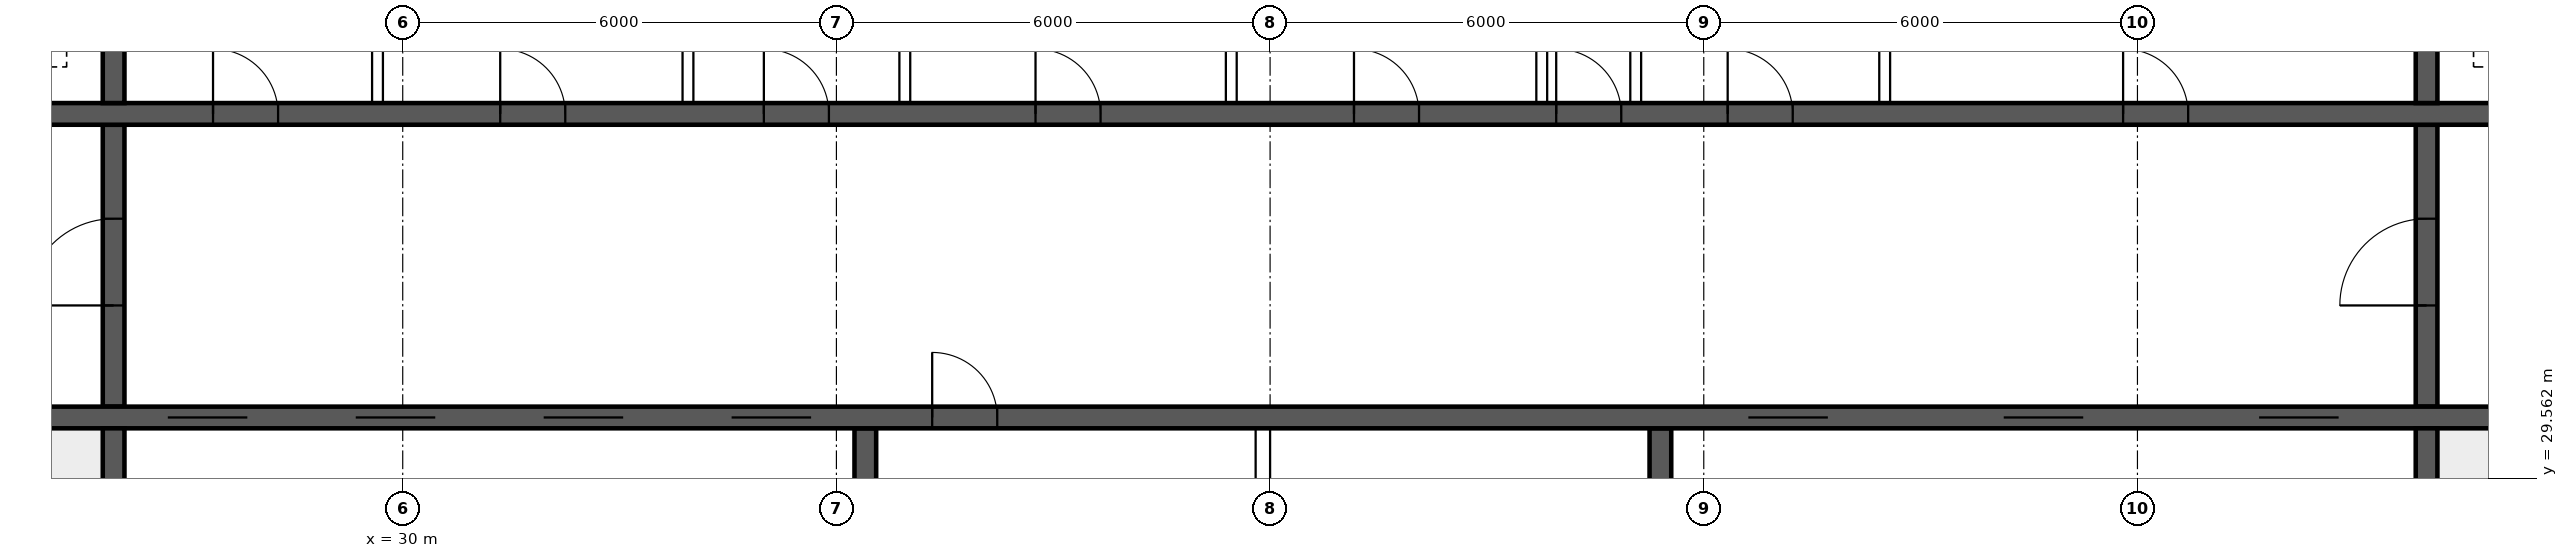
"""IFC4 building model, lengths in metres.
Left out: names, types, materials, properties, quantities, classifications, styles, units other than length and angle.
Written with IfcOpenShell. Run it as: python <this file> out.ifc"""

import sys

from ifc_helpers import new_model, si_unit, direction, frame, frame_2d, origin, place, context, subcontext, project, spatial, rectangle, extrude, element, fill, save


model = new_model("IFC4")
c1 = context("Model", 3, precision=1e-05, world=origin(), true_north=direction((0.0, 1.0)))
c2 = subcontext(c1, "Body", "Model", "MODEL_VIEW")
j1 = project(units=[si_unit("LENGTHUNIT", "METRE"), si_unit("PLANEANGLEUNIT", "RADIAN")], contexts=[c1])
p1 = place(None, origin())
s1 = spatial("IfcSite", under=j1, at=p1, CompositionType="ELEMENT")
p2 = place(p1, origin())
s2 = spatial("IfcBuilding", under=s1, at=p2, CompositionType="ELEMENT")
p3 = place(p2, frame((0.0, 0.0, 156.1)))
s3 = spatial("IfcBuildingStorey", under=s2, at=p3, CompositionType="ELEMENT", Elevation=156.1)
p4 = place(p3, frame((18.425, 30.4, 0.0), z_axis=(0.0, 0.0, 1.0), x_axis=(1.0, 0.0, 0.0)))
e1 = element("IfcWall", 1, at=p4, inside=s3, PredefinedType="SHEAR", context=c2, shape_type="SweptSolid", body=[
    extrude(rectangle(XDim=47.15, YDim=0.3, at=frame_2d((23.575, 0.0))), origin(), (0.0, 0.0, 1.0), 3.75),
])
p5 = place(p4, frame((0.4, 0.0, 0.0)))
e2 = element("IfcOpeningElement", 2, at=p5, cuts=e1, PredefinedType="OPENING", context=c2, shape_type="SweptSolid", body=[
    extrude(rectangle(XDim=1.0, YDim=2.1, at=frame_2d((0.5, 1.05))), frame((0.0, 0.16, 0.0), z_axis=(0.0, -1.0, 0.0), x_axis=(1.0, 0.0, 0.0)), (0.0, 0.0, 1.0), 0.32),
])
p6 = place(p4, frame((45.75, 0.0, 0.0)))
e3 = element("IfcOpeningElement", 3, at=p6, cuts=e1, PredefinedType="OPENING", context=c2, shape_type="SweptSolid", body=[
    extrude(rectangle(XDim=1.0, YDim=2.1, at=frame_2d((0.5, 1.05))), frame((0.0, 0.16, 0.0), z_axis=(0.0, -1.0, 0.0), x_axis=(1.0, 0.0, 0.0)), (0.0, 0.0, 1.0), 0.32),
])
p7 = place(p4, frame((8.325, 0.0, 0.0)))
e4 = element("IfcOpeningElement", 4, at=p7, cuts=e1, PredefinedType="OPENING", context=c2, shape_type="SweptSolid", body=[
    extrude(rectangle(XDim=1.1, YDim=2.1, at=frame_2d((0.55, 1.05))), frame((0.0, 0.16, 0.0), z_axis=(0.0, -1.0, 0.0), x_axis=(1.0, 0.0, 0.0)), (0.0, 0.0, 1.0), 0.32),
])
p8 = place(p4, frame((10.925, 0.0, 0.0)))
e5 = element("IfcOpeningElement", 5, at=p8, cuts=e1, PredefinedType="OPENING", context=c2, shape_type="SweptSolid", body=[
    extrude(rectangle(XDim=1.1, YDim=2.1, at=frame_2d((0.55, 1.05))), frame((0.0, 0.16, 0.0), z_axis=(0.0, -1.0, 0.0), x_axis=(1.0, 0.0, 0.0)), (0.0, 0.0, 1.0), 0.32),
])
p9 = place(p4, frame((13.525, 0.0, 0.0)))
e6 = element("IfcOpeningElement", 6, at=p9, cuts=e1, PredefinedType="OPENING", context=c2, shape_type="SweptSolid", body=[
    extrude(rectangle(XDim=1.1, YDim=2.1, at=frame_2d((0.55, 1.05))), frame((0.0, 0.16, 0.0), z_axis=(0.0, -1.0, 0.0), x_axis=(1.0, 0.0, 0.0)), (0.0, 0.0, 1.0), 0.32),
])
p10 = place(p4, frame((16.125, 0.0, 0.0)))
e7 = element("IfcOpeningElement", 7, at=p10, cuts=e1, PredefinedType="OPENING", context=c2, shape_type="SweptSolid", body=[
    extrude(rectangle(XDim=1.1, YDim=2.1, at=frame_2d((0.55, 1.05))), frame((0.0, 0.16, 0.0), z_axis=(0.0, -1.0, 0.0), x_axis=(1.0, 0.0, 0.0)), (0.0, 0.0, 1.0), 0.32),
])
p11 = place(p4, frame((18.9, 0.0, 0.0)))
e8 = element("IfcOpeningElement", 8, at=p11, cuts=e1, PredefinedType="OPENING", context=c2, shape_type="SweptSolid", body=[
    extrude(rectangle(XDim=0.9, YDim=2.1, at=frame_2d((0.45, 1.05))), frame((0.0, 0.16, 0.0), z_axis=(0.0, -1.0, 0.0), x_axis=(1.0, 0.0, 0.0)), (0.0, 0.0, 1.0), 0.32),
])
p12 = place(p4, frame((30.192, 0.0, 0.0)))
e9 = element("IfcOpeningElement", 9, at=p12, cuts=e1, PredefinedType="OPENING", context=c2, shape_type="SweptSolid", body=[
    extrude(rectangle(XDim=1.1, YDim=2.1, at=frame_2d((0.55, 1.05))), frame((0.0, 0.16, 0.0), z_axis=(0.0, -1.0, 0.0), x_axis=(1.0, 0.0, 0.0)), (0.0, 0.0, 1.0), 0.32),
])
p13 = place(p4, frame((33.725, 0.0, 0.0)))
e10 = element("IfcOpeningElement", 10, at=p13, cuts=e1, PredefinedType="OPENING", context=c2, shape_type="SweptSolid", body=[
    extrude(rectangle(XDim=1.1, YDim=2.1, at=frame_2d((0.55, 1.05))), frame((0.0, 0.16, 0.0), z_axis=(0.0, -1.0, 0.0), x_axis=(1.0, 0.0, 0.0)), (0.0, 0.0, 1.0), 0.32),
])
p14 = place(p4, frame((37.258, 0.0, 0.0)))
e11 = element("IfcOpeningElement", 11, at=p14, cuts=e1, PredefinedType="OPENING", context=c2, shape_type="SweptSolid", body=[
    extrude(rectangle(XDim=1.1, YDim=2.1, at=frame_2d((0.55, 1.05))), frame((0.0, 0.16, 0.0), z_axis=(0.0, -1.0, 0.0), x_axis=(1.0, 0.0, 0.0)), (0.0, 0.0, 1.0), 0.32),
])
p15 = place(p3, frame((18.425, 34.6, 0.0), z_axis=(0.0, 0.0, 1.0), x_axis=(1.0, 0.0, 0.0)))
e12 = element("IfcWall", 12, at=p15, inside=s3, PredefinedType="SHEAR", context=c2, shape_type="SweptSolid", body=[
    extrude(rectangle(XDim=47.15, YDim=0.3, at=frame_2d((23.575, 0.0))), origin(), (0.0, 0.0, 1.0), 3.75),
])
p16 = place(p15, frame((0.9, 0.0, 0.0)))
e13 = element("IfcOpeningElement", 13, at=p16, cuts=e12, PredefinedType="OPENING", context=c2, shape_type="SweptSolid", body=[
    extrude(rectangle(XDim=1.1, YDim=2.1, at=frame_2d((0.55, 1.05))), frame((0.0, 0.16, 0.0), z_axis=(0.0, -1.0, 0.0), x_axis=(1.0, 0.0, 0.0)), (0.0, 0.0, 1.0), 0.32),
])
p17 = place(p15, frame((45.15, 0.0, 0.0)))
e14 = element("IfcOpeningElement", 14, at=p17, cuts=e12, PredefinedType="OPENING", context=c2, shape_type="SweptSolid", body=[
    extrude(rectangle(XDim=1.1, YDim=2.1, at=frame_2d((0.55, 1.05))), frame((0.0, 0.16, 0.0), z_axis=(0.0, -1.0, 0.0), x_axis=(1.0, 0.0, 0.0)), (0.0, 0.0, 1.0), 0.32),
])
p18 = place(p15, frame((4.175, 0.0, 0.0)))
e15 = element("IfcOpeningElement", 15, at=p18, cuts=e12, PredefinedType="OPENING", context=c2, shape_type="SweptSolid", body=[
    extrude(rectangle(XDim=0.9, YDim=2.1, at=frame_2d((0.45, 1.05))), frame((0.0, 0.16, 0.0), z_axis=(0.0, -1.0, 0.0), x_axis=(1.0, 0.0, 0.0)), (0.0, 0.0, 1.0), 0.32),
])
p19 = place(p15, frame((42.075, 0.0, 0.0)))
e16 = element("IfcOpeningElement", 16, at=p19, cuts=e12, PredefinedType="OPENING", context=c2, shape_type="SweptSolid", body=[
    extrude(rectangle(XDim=0.9, YDim=2.1, at=frame_2d((0.45, 1.05))), frame((0.0, 0.16, 0.0), z_axis=(0.0, -1.0, 0.0), x_axis=(1.0, 0.0, 0.0)), (0.0, 0.0, 1.0), 0.32),
])
p20 = place(p15, frame((8.95, 0.0, 0.0)))
e17 = element("IfcOpeningElement", 17, at=p20, cuts=e12, PredefinedType="OPENING", context=c2, shape_type="SweptSolid", body=[
    extrude(rectangle(XDim=0.9, YDim=2.1, at=frame_2d((0.45, 1.05))), frame((0.0, 0.16, 0.0), z_axis=(0.0, -1.0, 0.0), x_axis=(1.0, 0.0, 0.0)), (0.0, 0.0, 1.0), 0.32),
])
p21 = place(p15, frame((12.924, 0.0, 0.0)))
e18 = element("IfcOpeningElement", 18, at=p21, cuts=e12, PredefinedType="OPENING", context=c2, shape_type="SweptSolid", body=[
    extrude(rectangle(XDim=0.9, YDim=2.1, at=frame_2d((0.45, 1.05))), frame((0.0, 0.16, 0.0), z_axis=(0.0, -1.0, 0.0), x_axis=(1.0, 0.0, 0.0)), (0.0, 0.0, 1.0), 0.32),
])
p22 = place(p15, frame((16.571, 0.0, 0.0)))
e19 = element("IfcOpeningElement", 19, at=p22, cuts=e12, PredefinedType="OPENING", context=c2, shape_type="SweptSolid", body=[
    extrude(rectangle(XDim=0.9, YDim=2.1, at=frame_2d((0.45, 1.05))), frame((0.0, 0.16, 0.0), z_axis=(0.0, -1.0, 0.0), x_axis=(1.0, 0.0, 0.0)), (0.0, 0.0, 1.0), 0.32),
])
p23 = place(p15, frame((20.33, 0.0, 0.0)))
e20 = element("IfcOpeningElement", 20, at=p23, cuts=e12, PredefinedType="OPENING", context=c2, shape_type="SweptSolid", body=[
    extrude(rectangle(XDim=0.9, YDim=2.1, at=frame_2d((0.45, 1.05))), frame((0.0, 0.16, 0.0), z_axis=(0.0, -1.0, 0.0), x_axis=(1.0, 0.0, 0.0)), (0.0, 0.0, 1.0), 0.32),
])
p24 = place(p15, frame((24.736, 0.0, 0.0)))
e21 = element("IfcOpeningElement", 21, at=p24, cuts=e12, PredefinedType="OPENING", context=c2, shape_type="SweptSolid", body=[
    extrude(rectangle(XDim=0.9, YDim=2.1, at=frame_2d((0.45, 1.05))), frame((0.0, 0.16, 0.0), z_axis=(0.0, -1.0, 0.0), x_axis=(1.0, 0.0, 0.0)), (0.0, 0.0, 1.0), 0.32),
])
p25 = place(p15, frame((27.533, 0.0, 0.0)))
e22 = element("IfcOpeningElement", 22, at=p25, cuts=e12, PredefinedType="OPENING", context=c2, shape_type="SweptSolid", body=[
    extrude(rectangle(XDim=0.9, YDim=2.1, at=frame_2d((0.45, 1.05))), frame((0.0, 0.16, 0.0), z_axis=(0.0, -1.0, 0.0), x_axis=(1.0, 0.0, 0.0)), (0.0, 0.0, 1.0), 0.32),
])
p26 = place(p15, frame((29.906, 0.0, 0.0)))
e23 = element("IfcOpeningElement", 23, at=p26, cuts=e12, PredefinedType="OPENING", context=c2, shape_type="SweptSolid", body=[
    extrude(rectangle(XDim=0.9, YDim=2.1, at=frame_2d((0.45, 1.05))), frame((0.0, 0.16, 0.0), z_axis=(0.0, -1.0, 0.0), x_axis=(1.0, 0.0, 0.0)), (0.0, 0.0, 1.0), 0.32),
])
p27 = place(p15, frame((35.376, 0.0, 0.0)))
e24 = element("IfcOpeningElement", 24, at=p27, cuts=e12, PredefinedType="OPENING", context=c2, shape_type="SweptSolid", body=[
    extrude(rectangle(XDim=0.9, YDim=2.1, at=frame_2d((0.45, 1.05))), frame((0.0, 0.16, 0.0), z_axis=(0.0, -1.0, 0.0), x_axis=(1.0, 0.0, 0.0)), (0.0, 0.0, 1.0), 0.32),
])
for number, where, z_axis, x_axis in (
    (25, (26.0, 26.225, 0.0), (0.0, 0.0, 1.0), (0.0, 1.0, 0.0)),
    (26, (58.0, 26.225, 0.0), (0.0, 0.0, 1.0), (0.0, 1.0, 0.0)),
):
    element("IfcWall", number, at=place(p3, frame(where, z_axis=z_axis, x_axis=x_axis)), inside=s3, PredefinedType="SHEAR", context=c2, shape_type="SweptSolid", body=[
        extrude(rectangle(XDim=4.025, YDim=0.3, at=frame_2d((2.012, 0.0))), origin(), (0.0, 0.0, 1.0), 3.75),
    ])
p28 = place(p3, frame((26.0, 30.55, 0.0), z_axis=(0.0, 0.0, 1.0), x_axis=(0.0, 1.0, 0.0)))
e27 = element("IfcWall", 27, at=p28, inside=s3, PredefinedType="SHEAR", context=c2, shape_type="SweptSolid", body=[
    extrude(rectangle(XDim=3.9, YDim=0.3, at=frame_2d((1.95, 0.0))), origin(), (0.0, 0.0, 1.0), 3.75),
])
p29 = place(p28, frame((1.4, 0.0, 0.0)))
e28 = element("IfcOpeningElement", 28, at=p29, cuts=e27, PredefinedType="OPENING", context=c2, shape_type="SweptSolid", body=[
    extrude(rectangle(XDim=1.2, YDim=2.1, at=frame_2d((0.6, 1.05))), frame((0.0, 0.16, 0.0), z_axis=(0.0, -1.0, 0.0), x_axis=(1.0, 0.0, 0.0)), (0.0, 0.0, 1.0), 0.32),
])
p30 = place(p3, frame((58.0, 30.55, 0.0), z_axis=(0.0, 0.0, 1.0), x_axis=(0.0, 1.0, 0.0)))
e29 = element("IfcWall", 29, at=p30, inside=s3, PredefinedType="SHEAR", context=c2, shape_type="SweptSolid", body=[
    extrude(rectangle(XDim=3.9, YDim=0.3, at=frame_2d((1.95, 0.0))), origin(), (0.0, 0.0, 1.0), 3.75),
])
p31 = place(p30, frame((1.4, 0.0, 0.0)))
e30 = element("IfcOpeningElement", 30, at=p31, cuts=e29, PredefinedType="OPENING", context=c2, shape_type="SweptSolid", body=[
    extrude(rectangle(XDim=1.2, YDim=2.1, at=frame_2d((0.6, 1.05))), frame((0.0, 0.16, 0.0), z_axis=(0.0, -1.0, 0.0), x_axis=(1.0, 0.0, 0.0)), (0.0, 0.0, 1.0), 0.32),
])
for number, where, z_axis, x_axis in (
    (31, (26.0, 34.75, 0.0), (0.0, 0.0, 1.0), (0.0, 1.0, 0.0)),
    (32, (58.0, 34.75, 0.0), (0.0, 0.0, 1.0), (0.0, 1.0, 0.0)),
):
    element("IfcWall", number, at=place(p3, frame(where, z_axis=z_axis, x_axis=x_axis)), inside=s3, PredefinedType="SHEAR", context=c2, shape_type="SweptSolid", body=[
        extrude(rectangle(XDim=3.025, YDim=0.3, at=frame_2d((1.512, 0.0))), origin(), (0.0, 0.0, 1.0), 3.75),
    ])
for number, where, z_axis, x_axis in (
    (33, (36.4, 26.225, 0.0), (0.0, 0.0, 1.0), (0.0, 1.0, 0.0)),
    (34, (47.4, 26.225, 0.0), (0.0, 0.0, 1.0), (0.0, 1.0, 0.0)),
):
    element("IfcWall", number, at=place(p3, frame(where, z_axis=z_axis, x_axis=x_axis)), inside=s3, PredefinedType="SHEAR", context=c2, shape_type="SweptSolid", body=[
        extrude(rectangle(XDim=4.025, YDim=0.3, at=frame_2d((2.012, 0.0))), origin(), (0.0, 0.0, 1.0), 3.75),
    ])
for number, where, z_axis, x_axis in (
    (35, (29.651, 34.75, 0.0), (0.0, 0.0, 1.0), (0.0, 1.0, 0.0)),
    (36, (33.946, 34.75, 0.0), (0.0, 0.0, 1.0), (0.0, 1.0, 0.0)),
    (37, (36.946, 34.75, 0.0), (0.0, 0.0, 1.0), (0.0, 1.0, 0.0)),
    (38, (41.463, 34.75, 0.0), (0.0, 0.0, 1.0), (0.0, 1.0, 0.0)),
    (39, (45.758, 34.75, 0.0), (0.0, 0.0, 1.0), (0.0, 1.0, 0.0)),
    (40, (47.058, 34.75, 0.0), (0.0, 0.0, 1.0), (0.0, 1.0, 0.0)),
    (41, (50.503, 34.75, 0.0), (0.0, 0.0, 1.0), (0.0, 1.0, 0.0)),
):
    element("IfcWall", number, at=place(p3, frame(where, z_axis=z_axis, x_axis=x_axis)), inside=s3, PredefinedType="SOLIDWALL", context=c2, shape_type="SweptSolid", body=[
        extrude(rectangle(XDim=3.025, YDim=0.15, at=frame_2d((1.512, 0.0))), origin(), (0.0, 0.0, 1.0), 3.5),
    ])
p32 = place(p3, frame((41.9, 26.225, 0.0), z_axis=(0.0, 0.0, 1.0), x_axis=(0.0, 1.0, 0.0)))
e42 = element("IfcWall", 42, at=p32, inside=s3, PredefinedType="SOLIDWALL", context=c2, shape_type="SweptSolid", body=[
    extrude(rectangle(XDim=4.025, YDim=0.2, at=frame_2d((2.012, 0.0))), origin(), (0.0, 0.0, 1.0), 3.5),
])
p33 = place(p29, origin())
e43 = element("IfcDoor", 43, at=p33, inside=s3, OperationType="SINGLE_SWING_LEFT", PredefinedType="DOOR", context=c2, shape_type="SweptSolid", body=[
    extrude(rectangle(XDim=1.2, YDim=2.1, at=frame_2d((0.6, 1.05))), frame((0.0, 0.025, 0.0), z_axis=(0.0, -1.0, 0.0), x_axis=(1.0, 0.0, 0.0)), (0.0, 0.0, 1.0), 0.05),
])
fill(e28, e43)
p34 = place(p31, origin())
e44 = element("IfcDoor", 44, at=p34, inside=s3, OperationType="SINGLE_SWING_LEFT", PredefinedType="DOOR", context=c2, shape_type="SweptSolid", body=[
    extrude(rectangle(XDim=1.2, YDim=2.1, at=frame_2d((0.6, 1.05))), frame((0.0, 0.025, 0.0), z_axis=(0.0, -1.0, 0.0), x_axis=(1.0, 0.0, 0.0)), (0.0, 0.0, 1.0), 0.05),
])
fill(e30, e44)
p35 = place(p20, origin())
e45 = element("IfcDoor", 45, at=p35, inside=s3, OperationType="SINGLE_SWING_LEFT", PredefinedType="DOOR", context=c2, shape_type="SweptSolid", body=[
    extrude(rectangle(XDim=0.9, YDim=2.1, at=frame_2d((0.45, 1.05))), frame((0.0, 0.025, 0.0), z_axis=(0.0, -1.0, 0.0), x_axis=(1.0, 0.0, 0.0)), (0.0, 0.0, 1.0), 0.05),
])
fill(e17, e45)
p36 = place(p21, origin())
e46 = element("IfcDoor", 46, at=p36, inside=s3, OperationType="SINGLE_SWING_LEFT", PredefinedType="DOOR", context=c2, shape_type="SweptSolid", body=[
    extrude(rectangle(XDim=0.9, YDim=2.1, at=frame_2d((0.45, 1.05))), frame((0.0, 0.025, 0.0), z_axis=(0.0, -1.0, 0.0), x_axis=(1.0, 0.0, 0.0)), (0.0, 0.0, 1.0), 0.05),
])
fill(e18, e46)
p37 = place(p22, origin())
e47 = element("IfcDoor", 47, at=p37, inside=s3, OperationType="SINGLE_SWING_LEFT", PredefinedType="DOOR", context=c2, shape_type="SweptSolid", body=[
    extrude(rectangle(XDim=0.9, YDim=2.1, at=frame_2d((0.45, 1.05))), frame((0.0, 0.025, 0.0), z_axis=(0.0, -1.0, 0.0), x_axis=(1.0, 0.0, 0.0)), (0.0, 0.0, 1.0), 0.05),
])
fill(e19, e47)
p38 = place(p23, origin())
e48 = element("IfcDoor", 48, at=p38, inside=s3, OperationType="SINGLE_SWING_LEFT", PredefinedType="DOOR", context=c2, shape_type="SweptSolid", body=[
    extrude(rectangle(XDim=0.9, YDim=2.1, at=frame_2d((0.45, 1.05))), frame((0.0, 0.025, 0.0), z_axis=(0.0, -1.0, 0.0), x_axis=(1.0, 0.0, 0.0)), (0.0, 0.0, 1.0), 0.05),
])
fill(e20, e48)
p39 = place(p24, origin())
e49 = element("IfcDoor", 49, at=p39, inside=s3, OperationType="SINGLE_SWING_LEFT", PredefinedType="DOOR", context=c2, shape_type="SweptSolid", body=[
    extrude(rectangle(XDim=0.9, YDim=2.1, at=frame_2d((0.45, 1.05))), frame((0.0, 0.025, 0.0), z_axis=(0.0, -1.0, 0.0), x_axis=(1.0, 0.0, 0.0)), (0.0, 0.0, 1.0), 0.05),
])
fill(e21, e49)
p40 = place(p25, origin())
e50 = element("IfcDoor", 50, at=p40, inside=s3, OperationType="SINGLE_SWING_LEFT", PredefinedType="DOOR", context=c2, shape_type="SweptSolid", body=[
    extrude(rectangle(XDim=0.9, YDim=2.1, at=frame_2d((0.45, 1.05))), frame((0.0, 0.025, 0.0), z_axis=(0.0, -1.0, 0.0), x_axis=(1.0, 0.0, 0.0)), (0.0, 0.0, 1.0), 0.05),
])
fill(e22, e50)
p41 = place(p26, origin())
e51 = element("IfcDoor", 51, at=p41, inside=s3, OperationType="SINGLE_SWING_LEFT", PredefinedType="DOOR", context=c2, shape_type="SweptSolid", body=[
    extrude(rectangle(XDim=0.9, YDim=2.1, at=frame_2d((0.45, 1.05))), frame((0.0, 0.025, 0.0), z_axis=(0.0, -1.0, 0.0), x_axis=(1.0, 0.0, 0.0)), (0.0, 0.0, 1.0), 0.05),
])
fill(e23, e51)
p42 = place(p27, origin())
e52 = element("IfcDoor", 52, at=p42, inside=s3, OperationType="SINGLE_SWING_LEFT", PredefinedType="DOOR", context=c2, shape_type="SweptSolid", body=[
    extrude(rectangle(XDim=0.9, YDim=2.1, at=frame_2d((0.45, 1.05))), frame((0.0, 0.025, 0.0), z_axis=(0.0, -1.0, 0.0), x_axis=(1.0, 0.0, 0.0)), (0.0, 0.0, 1.0), 0.05),
])
fill(e24, e52)
p43 = place(p7, origin())
e53 = element("IfcDoor", 53, at=p43, inside=s3, OperationType="DOUBLE_DOOR_SLIDING", PredefinedType="DOOR", context=c2, shape_type="SweptSolid", body=[
    extrude(rectangle(XDim=1.1, YDim=2.1, at=frame_2d((0.55, 1.05))), frame((0.0, 0.025, 0.0), z_axis=(0.0, -1.0, 0.0), x_axis=(1.0, 0.0, 0.0)), (0.0, 0.0, 1.0), 0.05),
])
fill(e4, e53)
p44 = place(p8, origin())
e54 = element("IfcDoor", 54, at=p44, inside=s3, OperationType="DOUBLE_DOOR_SLIDING", PredefinedType="DOOR", context=c2, shape_type="SweptSolid", body=[
    extrude(rectangle(XDim=1.1, YDim=2.1, at=frame_2d((0.55, 1.05))), frame((0.0, 0.025, 0.0), z_axis=(0.0, -1.0, 0.0), x_axis=(1.0, 0.0, 0.0)), (0.0, 0.0, 1.0), 0.05),
])
fill(e5, e54)
p45 = place(p9, origin())
e55 = element("IfcDoor", 55, at=p45, inside=s3, OperationType="DOUBLE_DOOR_SLIDING", PredefinedType="DOOR", context=c2, shape_type="SweptSolid", body=[
    extrude(rectangle(XDim=1.1, YDim=2.1, at=frame_2d((0.55, 1.05))), frame((0.0, 0.025, 0.0), z_axis=(0.0, -1.0, 0.0), x_axis=(1.0, 0.0, 0.0)), (0.0, 0.0, 1.0), 0.05),
])
fill(e6, e55)
p46 = place(p10, origin())
e56 = element("IfcDoor", 56, at=p46, inside=s3, OperationType="DOUBLE_DOOR_SLIDING", PredefinedType="DOOR", context=c2, shape_type="SweptSolid", body=[
    extrude(rectangle(XDim=1.1, YDim=2.1, at=frame_2d((0.55, 1.05))), frame((0.0, 0.025, 0.0), z_axis=(0.0, -1.0, 0.0), x_axis=(1.0, 0.0, 0.0)), (0.0, 0.0, 1.0), 0.05),
])
fill(e7, e56)
p47 = place(p11, origin())
e57 = element("IfcDoor", 57, at=p47, inside=s3, OperationType="SINGLE_SWING_LEFT", PredefinedType="DOOR", context=c2, shape_type="SweptSolid", body=[
    extrude(rectangle(XDim=0.9, YDim=2.1, at=frame_2d((0.45, 1.05))), frame((0.0, 0.025, 0.0), z_axis=(0.0, -1.0, 0.0), x_axis=(1.0, 0.0, 0.0)), (0.0, 0.0, 1.0), 0.05),
])
fill(e8, e57)
p48 = place(p12, origin())
e58 = element("IfcDoor", 58, at=p48, inside=s3, OperationType="DOUBLE_DOOR_SLIDING", PredefinedType="DOOR", context=c2, shape_type="SweptSolid", body=[
    extrude(rectangle(XDim=1.1, YDim=2.1, at=frame_2d((0.55, 1.05))), frame((0.0, 0.025, 0.0), z_axis=(0.0, -1.0, 0.0), x_axis=(1.0, 0.0, 0.0)), (0.0, 0.0, 1.0), 0.05),
])
fill(e9, e58)
p49 = place(p13, origin())
e59 = element("IfcDoor", 59, at=p49, inside=s3, OperationType="DOUBLE_DOOR_SLIDING", PredefinedType="DOOR", context=c2, shape_type="SweptSolid", body=[
    extrude(rectangle(XDim=1.1, YDim=2.1, at=frame_2d((0.55, 1.05))), frame((0.0, 0.025, 0.0), z_axis=(0.0, -1.0, 0.0), x_axis=(1.0, 0.0, 0.0)), (0.0, 0.0, 1.0), 0.05),
])
fill(e10, e59)
p50 = place(p14, origin())
e60 = element("IfcDoor", 60, at=p50, inside=s3, OperationType="DOUBLE_DOOR_SLIDING", PredefinedType="DOOR", context=c2, shape_type="SweptSolid", body=[
    extrude(rectangle(XDim=1.1, YDim=2.1, at=frame_2d((0.55, 1.05))), frame((0.0, 0.025, 0.0), z_axis=(0.0, -1.0, 0.0), x_axis=(1.0, 0.0, 0.0)), (0.0, 0.0, 1.0), 0.05),
])
fill(e11, e60)
save(model, sys.argv[1])
